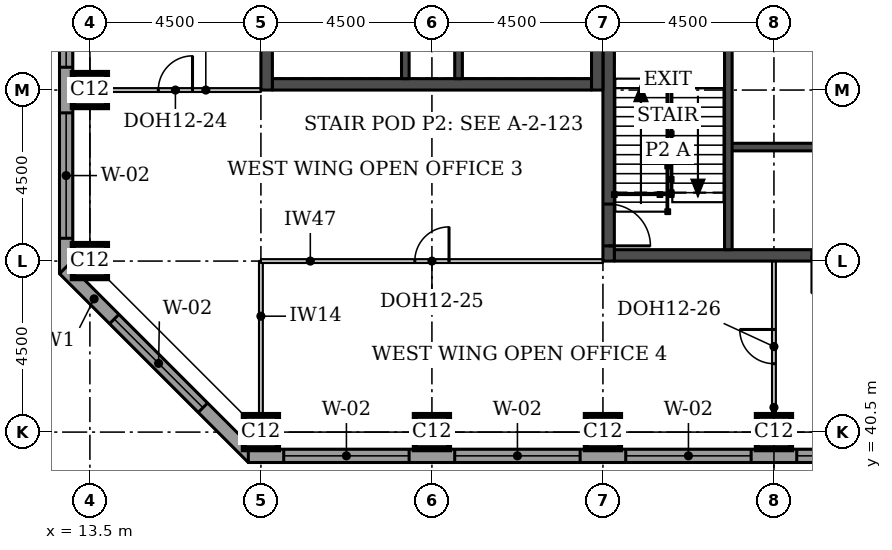
"""IFC4 building model, lengths in metres.
Left out: names, types, materials, properties, quantities, classifications, styles, units other than length and angle.
Written with IfcOpenShell. Run it as: python <this file> out.ifc"""

import sys

from ifc_helpers import new_model, si_unit, direction, frame, frame_2d, origin, origin_2d, place, context, subcontext, project, spatial, rectangle, extrude, element, fill, save


model = new_model("IFC4")
c1 = context("Model", 3, precision=1e-05, world=origin(), true_north=direction((0.0, 1.0)))
c2 = subcontext(c1, "Body", "Model", "MODEL_VIEW")
j1 = project(units=[si_unit("LENGTHUNIT", "METRE"), si_unit("PLANEANGLEUNIT", "RADIAN")], contexts=[c1])
p1 = place(None, origin())
s1 = spatial("IfcSite", under=j1, at=p1, CompositionType="ELEMENT")
p2 = place(p1, origin())
s2 = spatial("IfcBuilding", under=s1, at=p2, CompositionType="ELEMENT")
p3 = place(p2, frame((0.0, 0.0, 248.9)))
s3 = spatial("IfcBuildingStorey", under=s2, at=p3, CompositionType="ELEMENT", Elevation=248.9)
for number, where, z_axis, x_axis in (
    (1, (18.0, 40.5, 0.0), (0.0, 0.0, 1.0), (1.0, 0.0, 0.0)),
    (2, (22.5, 40.5, 0.0), (0.0, 0.0, 1.0), (1.0, 0.0, 0.0)),
    (3, (27.0, 40.5, 0.0), (0.0, 0.0, 1.0), (1.0, 0.0, 0.0)),
    (4, (31.5, 40.5, 0.0), (0.0, 0.0, 1.0), (1.0, 0.0, 0.0)),
    (5, (13.5, 45.0, 0.0), (0.0, 0.0, 1.0), (1.0, 0.0, 0.0)),
    (6, (13.5, 49.5, 0.0), (0.0, 0.0, 1.0), (1.0, 0.0, 0.0)),
):
    element("IfcColumn", number, at=place(p3, frame(where, z_axis=z_axis, x_axis=x_axis)), inside=s3, PredefinedType="COLUMN", context=c2, shape_type="SweptSolid", body=[
        extrude(rectangle(XDim=0.9, YDim=0.9, at=origin_2d()), origin(), (0.0, 0.0, 1.0), 3.7),
    ])
p4 = place(p3, frame((27.3, 45.15, 0.0), z_axis=(0.0, 0.0, 1.0), x_axis=(1.0, 0.0, 0.0)))
e7 = element("IfcWall", 7, at=p4, inside=s3, PredefinedType="SHEAR", context=c2, shape_type="SweptSolid", body=[
    extrude(rectangle(XDim=8.4, YDim=0.3, at=frame_2d((4.2, 0.0))), origin(), (0.0, 0.0, 1.0), 3.7),
])
p5 = place(p4, frame((5.2, 0.0, 0.0)))
e8 = element("IfcOpeningElement", 8, at=p5, cuts=e7, PredefinedType="OPENING", context=c2, shape_type="SweptSolid", body=[
    extrude(rectangle(XDim=1.0, YDim=2.1, at=frame_2d((0.5, 1.05))), frame((0.0, 0.16, 0.0), z_axis=(0.0, -1.0, 0.0), x_axis=(1.0, 0.0, 0.0)), (0.0, 0.0, 1.0), 0.32),
])
p6 = place(p3, frame((27.15, 45.0, 0.0), z_axis=(0.0, 0.0, 1.0), x_axis=(0.0, 1.0, 0.0)))
e9 = element("IfcWall", 9, at=p6, inside=s3, PredefinedType="SHEAR", context=c2, shape_type="SweptSolid", body=[
    extrude(rectangle(XDim=9.0, YDim=0.3, at=frame_2d((4.5, 0.0))), origin(), (0.0, 0.0, 1.0), 3.7),
])
p7 = place(p6, frame((0.4, 0.0, 0.0)))
e10 = element("IfcOpeningElement", 10, at=p7, cuts=e9, PredefinedType="OPENING", context=c2, shape_type="SweptSolid", body=[
    extrude(rectangle(XDim=1.1, YDim=2.1, at=frame_2d((0.55, 1.05))), frame((0.0, 0.16, 0.0), z_axis=(0.0, -1.0, 0.0), x_axis=(1.0, 0.0, 0.0)), (0.0, 0.0, 1.0), 0.32),
])
p8 = place(p3, frame((18.3, 49.65, 0.0), z_axis=(0.0, 0.0, 1.0), x_axis=(1.0, 0.0, 0.0)))
e11 = element("IfcWall", 11, at=p8, inside=s3, PredefinedType="SHEAR", context=c2, shape_type="SweptSolid", body=[
    extrude(rectangle(XDim=8.4, YDim=0.3, at=frame_2d((4.2, 0.0))), origin(), (0.0, 0.0, 1.0), 3.7),
])
p9 = place(p3, frame((18.15, 49.5, 0.0), z_axis=(0.0, 0.0, 1.0), x_axis=(0.0, 1.0, 0.0)))
e12 = element("IfcWall", 12, at=p9, inside=s3, PredefinedType="SHEAR", context=c2, shape_type="SweptSolid", body=[
    extrude(rectangle(XDim=9.0, YDim=0.3, at=frame_2d((4.5, 0.0))), origin(), (0.0, 0.0, 1.0), 3.7),
])
p10 = place(p3, frame((26.85, 49.5, 0.0), z_axis=(0.0, 0.0, 1.0), x_axis=(0.0, 1.0, 0.0)))
e13 = element("IfcWall", 13, at=p10, inside=s3, PredefinedType="SHEAR", context=c2, shape_type="SweptSolid", body=[
    extrude(rectangle(XDim=9.0, YDim=0.3, at=frame_2d((4.5, 0.0))), origin(), (0.0, 0.0, 1.0), 3.7),
])
p11 = place(p10, frame((6.6, 0.0, 0.0)))
e14 = element("IfcOpeningElement", 14, at=p11, cuts=e13, PredefinedType="OPENING", context=c2, shape_type="SweptSolid", body=[
    extrude(rectangle(XDim=1.8, YDim=2.1, at=frame_2d((0.9, 1.05))), frame((0.0, 0.16, 0.0), z_axis=(0.0, -1.0, 0.0), x_axis=(1.0, 0.0, 0.0)), (0.0, 0.0, 1.0), 0.32),
])
p12 = place(p3, frame((12.875, 58.831, 0.0), z_axis=(0.0, 0.0, 1.0), x_axis=(0.0, -1.0, 0.0)))
e15 = element("IfcWall", 15, at=p12, inside=s3, PredefinedType="STANDARD", context=c2, shape_type="SweptSolid", body=[
    extrude(rectangle(XDim=14.163, YDim=0.35, at=frame_2d((7.081, 0.0))), origin(), (0.0, 0.0, 1.0), 3.525),
])
p13 = place(p12, frame((0.931, 0.0, 0.9)))
e16 = element("IfcOpeningElement", 16, at=p13, cuts=e15, PredefinedType="OPENING", context=c2, shape_type="SweptSolid", body=[
    extrude(rectangle(XDim=3.3, YDim=1.9, at=frame_2d((1.65, 0.95))), frame((0.0, 0.185, 0.0), z_axis=(0.0, -1.0, 0.0), x_axis=(1.0, 0.0, 0.0)), (0.0, 0.0, 1.0), 0.37),
])
p14 = place(p12, frame((5.431, 0.0, 0.9)))
e17 = element("IfcOpeningElement", 17, at=p14, cuts=e15, PredefinedType="OPENING", context=c2, shape_type="SweptSolid", body=[
    extrude(rectangle(XDim=3.3, YDim=1.9, at=frame_2d((1.65, 0.95))), frame((0.0, 0.185, 0.0), z_axis=(0.0, -1.0, 0.0), x_axis=(1.0, 0.0, 0.0)), (0.0, 0.0, 1.0), 0.37),
])
p15 = place(p12, frame((9.931, 0.0, 0.9)))
e18 = element("IfcOpeningElement", 18, at=p15, cuts=e15, PredefinedType="OPENING", context=c2, shape_type="SweptSolid", body=[
    extrude(rectangle(XDim=3.3, YDim=1.9, at=frame_2d((1.65, 0.95))), frame((0.0, 0.185, 0.0), z_axis=(0.0, -1.0, 0.0), x_axis=(1.0, 0.0, 0.0)), (0.0, 0.0, 1.0), 0.37),
])
p16 = place(p3, frame((12.824, 44.792, 0.0), z_axis=(0.0, 0.0, 1.0), x_axis=(0.707106781187, -0.707106781187, 0.0)))
e19 = element("IfcWall", 19, at=p16, inside=s3, PredefinedType="STANDARD", context=c2, shape_type="SweptSolid", body=[
    extrude(rectangle(XDim=7.027, YDim=0.35, at=frame_2d((3.513, 0.0))), origin(), (0.0, 0.0, 1.0), 3.525),
])
p17 = place(p16, frame((1.863, 0.0, 0.9)))
e20 = element("IfcOpeningElement", 20, at=p17, cuts=e19, PredefinedType="OPENING", context=c2, shape_type="SweptSolid", body=[
    extrude(rectangle(XDim=3.3, YDim=1.9, at=frame_2d((1.65, 0.95))), frame((0.0, 0.185, 0.0), z_axis=(0.0, -1.0, 0.0), x_axis=(1.0, 0.0, 0.0)), (0.0, 0.0, 1.0), 0.37),
])
p18 = place(p3, frame((17.669, 39.875, 0.0), z_axis=(0.0, 0.0, 1.0), x_axis=(1.0, 0.0, 0.0)))
e21 = element("IfcWall", 21, at=p18, inside=s3, PredefinedType="STANDARD", context=c2, shape_type="SweptSolid", body=[
    extrude(rectangle(XDim=18.331, YDim=0.35, at=frame_2d((9.166, 0.0))), origin(), (0.0, 0.0, 1.0), 3.525),
])
p19 = place(p18, frame((0.931, 0.0, 0.9)))
e22 = element("IfcOpeningElement", 22, at=p19, cuts=e21, PredefinedType="OPENING", context=c2, shape_type="SweptSolid", body=[
    extrude(rectangle(XDim=3.3, YDim=1.9, at=frame_2d((1.65, 0.95))), frame((0.0, 0.185, 0.0), z_axis=(0.0, -1.0, 0.0), x_axis=(1.0, 0.0, 0.0)), (0.0, 0.0, 1.0), 0.37),
])
p20 = place(p18, frame((5.431, 0.0, 0.9)))
e23 = element("IfcOpeningElement", 23, at=p20, cuts=e21, PredefinedType="OPENING", context=c2, shape_type="SweptSolid", body=[
    extrude(rectangle(XDim=3.3, YDim=1.9, at=frame_2d((1.65, 0.95))), frame((0.0, 0.185, 0.0), z_axis=(0.0, -1.0, 0.0), x_axis=(1.0, 0.0, 0.0)), (0.0, 0.0, 1.0), 0.37),
])
p21 = place(p18, frame((9.931, 0.0, 0.9)))
e24 = element("IfcOpeningElement", 24, at=p21, cuts=e21, PredefinedType="OPENING", context=c2, shape_type="SweptSolid", body=[
    extrude(rectangle(XDim=3.3, YDim=1.9, at=frame_2d((1.65, 0.95))), frame((0.0, 0.185, 0.0), z_axis=(0.0, -1.0, 0.0), x_axis=(1.0, 0.0, 0.0)), (0.0, 0.0, 1.0), 0.37),
])
p22 = place(p18, frame((14.431, 0.0, 0.9)))
e25 = element("IfcOpeningElement", 25, at=p22, cuts=e21, PredefinedType="OPENING", context=c2, shape_type="SweptSolid", body=[
    extrude(rectangle(XDim=3.3, YDim=1.9, at=frame_2d((1.65, 0.95))), frame((0.0, 0.185, 0.0), z_axis=(0.0, -1.0, 0.0), x_axis=(1.0, 0.0, 0.0)), (0.0, 0.0, 1.0), 0.37),
])
p23 = place(p3, frame((13.5, 49.5, 0.0), z_axis=(0.0, 0.0, 1.0), x_axis=(1.0, 0.0, 0.0)))
e26 = element("IfcWall", 26, at=p23, inside=s3, PredefinedType="PARTITIONING", context=c2, shape_type="SweptSolid", body=[
    extrude(rectangle(XDim=4.5, YDim=0.1, at=frame_2d((2.25, 0.0))), origin(), (0.0, 0.0, 1.0), 3.55),
])
p24 = place(p23, frame((1.8, 0.0, 0.0)))
e27 = element("IfcOpeningElement", 27, at=p24, cuts=e26, PredefinedType="OPENING", context=c2, shape_type="SweptSolid", body=[
    extrude(rectangle(XDim=0.9, YDim=2.1, at=frame_2d((0.45, 1.05))), frame((0.0, 0.06, 0.0), z_axis=(0.0, -1.0, 0.0), x_axis=(1.0, 0.0, 0.0)), (0.0, 0.0, 1.0), 0.12),
])
p25 = place(p3, frame((18.0, 40.5, 0.0), z_axis=(0.0, 0.0, 1.0), x_axis=(0.0, 1.0, 0.0)))
e28 = element("IfcWall", 28, at=p25, inside=s3, PredefinedType="PARTITIONING", context=c2, shape_type="SweptSolid", body=[
    extrude(rectangle(XDim=4.5, YDim=0.1, at=frame_2d((2.25, 0.0))), origin(), (0.0, 0.0, 1.0), 3.55),
])
p26 = place(p3, frame((18.0, 45.0, 0.0), z_axis=(0.0, 0.0, 1.0), x_axis=(1.0, 0.0, 0.0)))
e29 = element("IfcWall", 29, at=p26, inside=s3, PredefinedType="PARTITIONING", context=c2, shape_type="SweptSolid", body=[
    extrude(rectangle(XDim=9.0, YDim=0.1, at=frame_2d((4.5, 0.0))), origin(), (0.0, 0.0, 1.0), 2.55),
])
p27 = place(p26, frame((4.05, 0.0, 0.0)))
e30 = element("IfcOpeningElement", 30, at=p27, cuts=e29, PredefinedType="OPENING", context=c2, shape_type="SweptSolid", body=[
    extrude(rectangle(XDim=0.9, YDim=2.1, at=frame_2d((0.45, 1.05))), frame((0.0, 0.06, 0.0), z_axis=(0.0, -1.0, 0.0), x_axis=(1.0, 0.0, 0.0)), (0.0, 0.0, 1.0), 0.12),
])
p28 = place(p3, frame((31.5, 45.0, 0.0), z_axis=(0.0, 0.0, 1.0), x_axis=(0.0, -1.0, 0.0)))
e31 = element("IfcWall", 31, at=p28, inside=s3, PredefinedType="PARTITIONING", context=c2, shape_type="SweptSolid", body=[
    extrude(rectangle(XDim=4.5, YDim=0.1, at=frame_2d((2.25, 0.0))), origin(), (0.0, 0.0, 1.0), 3.55),
])
p29 = place(p28, frame((1.8, 0.0, 0.0)))
e32 = element("IfcOpeningElement", 32, at=p29, cuts=e31, PredefinedType="OPENING", context=c2, shape_type="SweptSolid", body=[
    extrude(rectangle(XDim=0.9, YDim=2.1, at=frame_2d((0.45, 1.05))), frame((0.0, 0.06, 0.0), z_axis=(0.0, -1.0, 0.0), x_axis=(1.0, 0.0, 0.0)), (0.0, 0.0, 1.0), 0.12),
])
p30 = place(p3, frame((30.3, 48.0, 0.0), z_axis=(0.0, 0.0, 1.0), x_axis=(1.0, 0.0, 0.0)))
e33 = element("IfcWall", 33, at=p30, inside=s3, PredefinedType="SOLIDWALL", context=c2, shape_type="SweptSolid", body=[
    extrude(rectangle(XDim=2.4, YDim=0.2, at=frame_2d((1.2, 0.0))), origin(), (0.0, 0.0, 1.0), 3.55),
])
p31 = place(p3, frame((30.3, 45.3, 0.0), z_axis=(0.0, 0.0, 1.0), x_axis=(0.0, 1.0, 0.0)))
e34 = element("IfcWall", 34, at=p31, inside=s3, PredefinedType="SOLIDWALL", context=c2, shape_type="SweptSolid", body=[
    extrude(rectangle(XDim=5.7, YDim=0.2, at=frame_2d((2.85, 0.0))), origin(), (0.0, 0.0, 1.0), 3.55),
])
for number, where, z_axis, x_axis in (
    (35, (21.8, 49.8, 0.0), (0.0, 0.0, 1.0), (0.0, 1.0, 0.0)),
    (36, (23.2, 49.8, 0.0), (0.0, 0.0, 1.0), (0.0, 1.0, 0.0)),
):
    element("IfcWall", number, at=place(p3, frame(where, z_axis=z_axis, x_axis=x_axis)), inside=s3, PredefinedType="SOLIDWALL", context=c2, shape_type="SweptSolid", body=[
        extrude(rectangle(XDim=6.05, YDim=0.2, at=frame_2d((3.025, 0.0))), origin(), (0.0, 0.0, 1.0), 3.55),
    ])
p32 = place(p14, origin())
e37 = element("IfcWindow", 37, at=p32, inside=s3, PartitioningType="SINGLE_PANEL", PredefinedType="WINDOW", context=c2, shape_type="SweptSolid", body=[
    extrude(rectangle(XDim=3.3, YDim=1.9, at=frame_2d((1.65, 0.95))), frame((0.0, 0.085, 0.0), z_axis=(0.0, -1.0, 0.0), x_axis=(1.0, 0.0, 0.0)), (0.0, 0.0, 1.0), 0.06),
])
fill(e17, e37)
p33 = place(p15, origin())
e38 = element("IfcWindow", 38, at=p33, inside=s3, PartitioningType="SINGLE_PANEL", PredefinedType="WINDOW", context=c2, shape_type="SweptSolid", body=[
    extrude(rectangle(XDim=3.3, YDim=1.9, at=frame_2d((1.65, 0.95))), frame((0.0, 0.085, 0.0), z_axis=(0.0, -1.0, 0.0), x_axis=(1.0, 0.0, 0.0)), (0.0, 0.0, 1.0), 0.06),
])
fill(e18, e38)
p34 = place(p17, origin())
e39 = element("IfcWindow", 39, at=p34, inside=s3, PartitioningType="SINGLE_PANEL", PredefinedType="WINDOW", context=c2, shape_type="SweptSolid", body=[
    extrude(rectangle(XDim=3.3, YDim=1.9, at=frame_2d((1.65, 0.95))), frame((0.0, 0.085, 0.0), z_axis=(0.0, -1.0, 0.0), x_axis=(1.0, 0.0, 0.0)), (0.0, 0.0, 1.0), 0.06),
])
fill(e20, e39)
p35 = place(p19, origin())
e40 = element("IfcWindow", 40, at=p35, inside=s3, PartitioningType="SINGLE_PANEL", PredefinedType="WINDOW", context=c2, shape_type="SweptSolid", body=[
    extrude(rectangle(XDim=3.3, YDim=1.9, at=frame_2d((1.65, 0.95))), frame((0.0, 0.085, 0.0), z_axis=(0.0, -1.0, 0.0), x_axis=(1.0, 0.0, 0.0)), (0.0, 0.0, 1.0), 0.06),
])
fill(e22, e40)
p36 = place(p20, origin())
e41 = element("IfcWindow", 41, at=p36, inside=s3, PartitioningType="SINGLE_PANEL", PredefinedType="WINDOW", context=c2, shape_type="SweptSolid", body=[
    extrude(rectangle(XDim=3.3, YDim=1.9, at=frame_2d((1.65, 0.95))), frame((0.0, 0.085, 0.0), z_axis=(0.0, -1.0, 0.0), x_axis=(1.0, 0.0, 0.0)), (0.0, 0.0, 1.0), 0.06),
])
fill(e23, e41)
p37 = place(p21, origin())
e42 = element("IfcWindow", 42, at=p37, inside=s3, PartitioningType="SINGLE_PANEL", PredefinedType="WINDOW", context=c2, shape_type="SweptSolid", body=[
    extrude(rectangle(XDim=3.3, YDim=1.9, at=frame_2d((1.65, 0.95))), frame((0.0, 0.085, 0.0), z_axis=(0.0, -1.0, 0.0), x_axis=(1.0, 0.0, 0.0)), (0.0, 0.0, 1.0), 0.06),
])
fill(e24, e42)
p38 = place(p22, origin())
e43 = element("IfcWindow", 43, at=p38, inside=s3, PartitioningType="SINGLE_PANEL", PredefinedType="WINDOW", context=c2, shape_type="SweptSolid", body=[
    extrude(rectangle(XDim=3.3, YDim=1.9, at=frame_2d((1.65, 0.95))), frame((0.0, 0.085, 0.0), z_axis=(0.0, -1.0, 0.0), x_axis=(1.0, 0.0, 0.0)), (0.0, 0.0, 1.0), 0.06),
])
fill(e25, e43)
p39 = place(p24, origin())
e44 = element("IfcDoor", 44, at=p39, inside=s3, OperationType="SINGLE_SWING_RIGHT", PredefinedType="DOOR", context=c2, shape_type="SweptSolid", body=[
    extrude(rectangle(XDim=0.9, YDim=2.1, at=frame_2d((0.45, 1.05))), frame((0.0, 0.025, 0.0), z_axis=(0.0, -1.0, 0.0), x_axis=(1.0, 0.0, 0.0)), (0.0, 0.0, 1.0), 0.05),
])
fill(e27, e44)
p40 = place(p27, origin())
e45 = element("IfcDoor", 45, at=p40, inside=s3, OperationType="SINGLE_SWING_RIGHT", PredefinedType="DOOR", context=c2, shape_type="SweptSolid", body=[
    extrude(rectangle(XDim=0.9, YDim=2.1, at=frame_2d((0.45, 1.05))), frame((0.0, 0.025, 0.0), z_axis=(0.0, -1.0, 0.0), x_axis=(1.0, 0.0, 0.0)), (0.0, 0.0, 1.0), 0.05),
])
fill(e30, e45)
p41 = place(p29, frame((0.9, 0.0, 0.0), z_axis=(0.0, 0.0, 1.0), x_axis=(-1.0, 0.0, 0.0)))
e46 = element("IfcDoor", 46, at=p41, inside=s3, OperationType="SINGLE_SWING_RIGHT", PredefinedType="DOOR", context=c2, shape_type="SweptSolid", body=[
    extrude(rectangle(XDim=0.9, YDim=2.1, at=frame_2d((0.45, 1.05))), frame((0.0, 0.025, 0.0), z_axis=(0.0, -1.0, 0.0), x_axis=(1.0, 0.0, 0.0)), (0.0, 0.0, 1.0), 0.05),
])
fill(e32, e46)
p42 = place(p7, frame((1.1, 0.0, 0.0), z_axis=(0.0, 0.0, 1.0), x_axis=(-1.0, 0.0, 0.0)))
e47 = element("IfcDoor", 47, at=p42, inside=s3, OperationType="SINGLE_SWING_RIGHT", PredefinedType="DOOR", context=c2, shape_type="SweptSolid", body=[
    extrude(rectangle(XDim=1.1, YDim=2.1, at=frame_2d((0.55, 1.05))), frame((0.0, 0.025, 0.0), z_axis=(0.0, -1.0, 0.0), x_axis=(1.0, 0.0, 0.0)), (0.0, 0.0, 1.0), 0.05),
])
fill(e10, e47)
save(model, sys.argv[1])
